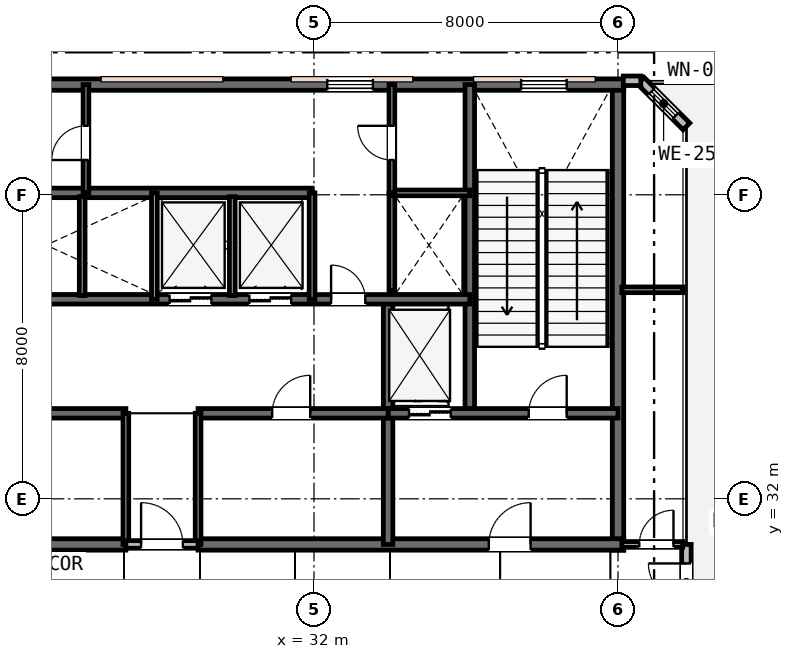
"""IFC4 building model, lengths in metres.
Left out: names, types, materials, properties, quantities, classifications, styles, units other than length and angle.
Written with IfcOpenShell. Run it as: python <this file> out.ifc"""

import sys

from ifc_helpers import new_model, si_unit, direction, frame, frame_2d, origin, place, context, subcontext, project, spatial, rectangle, extrude, element, fill, save


model = new_model("IFC4")
c1 = context("Model", 3, precision=1e-05, world=origin(), true_north=direction((0.0, 1.0)))
c2 = subcontext(c1, "Body", "Model", "MODEL_VIEW")
j1 = project(units=[si_unit("LENGTHUNIT", "METRE"), si_unit("PLANEANGLEUNIT", "RADIAN")], contexts=[c1])
p1 = place(None, origin())
s1 = spatial("IfcSite", under=j1, at=p1, CompositionType="ELEMENT")
p2 = place(p1, origin())
s2 = spatial("IfcBuilding", under=s1, at=p2, CompositionType="ELEMENT")
p3 = place(p2, frame((0.0, 0.0, 290.6)))
s3 = spatial("IfcBuildingStorey", under=s2, at=p3, CompositionType="ELEMENT", Elevation=290.6)
p4 = place(p3, frame((40.0, 30.65, 0.0), z_axis=(0.0, 0.0, 1.0), x_axis=(0.0, 1.0, 0.0)))
e1 = element("IfcWall", 1, at=p4, inside=s3, PredefinedType="SHEAR", context=c2, shape_type="SweptSolid", body=[
    extrude(rectangle(XDim=12.3, YDim=0.3, at=frame_2d((6.15, 0.0))), origin(), (0.0, 0.0, 1.0), 5.2),
])
p5 = place(p3, frame((15.85, 42.9, 0.0), z_axis=(0.0, 0.0, 1.0), x_axis=(1.0, 0.0, 0.0)))
e2 = element("IfcWall", 2, at=p5, inside=s3, PredefinedType="SHEAR", context=c2, shape_type="SweptSolid", body=[
    extrude(rectangle(XDim=24.3, YDim=0.3, at=frame_2d((12.15, 0.0))), origin(), (0.0, 0.0, 1.0), 5.2),
])
p6 = place(p5, frame((1.6, 0.0, 0.95)))
e3 = element("IfcOpeningElement", 3, at=p6, cuts=e2, PredefinedType="OPENING", context=c2, shape_type="SweptSolid", body=[
    extrude(rectangle(XDim=1.2, YDim=1.6, at=frame_2d((0.6, 0.8))), frame((0.0, 0.16, 0.0), z_axis=(0.0, -1.0, 0.0), x_axis=(1.0, 0.0, 0.0)), (0.0, 0.0, 1.0), 0.32),
])
p7 = place(p5, frame((16.5, 0.0, 0.95)))
e4 = element("IfcOpeningElement", 4, at=p7, cuts=e2, PredefinedType="OPENING", context=c2, shape_type="SweptSolid", body=[
    extrude(rectangle(XDim=1.2, YDim=1.6, at=frame_2d((0.6, 0.8))), frame((0.0, 0.16, 0.0), z_axis=(0.0, -1.0, 0.0), x_axis=(1.0, 0.0, 0.0)), (0.0, 0.0, 1.0), 0.32),
])
p8 = place(p5, frame((21.6, 0.0, 0.95)))
e5 = element("IfcOpeningElement", 5, at=p8, cuts=e2, PredefinedType="OPENING", context=c2, shape_type="SweptSolid", body=[
    extrude(rectangle(XDim=1.2, YDim=1.6, at=frame_2d((0.6, 0.8))), frame((0.0, 0.16, 0.0), z_axis=(0.0, -1.0, 0.0), x_axis=(1.0, 0.0, 0.0)), (0.0, 0.0, 1.0), 0.32),
])
p9 = place(p3, frame((15.85, 30.8, 0.0), z_axis=(0.0, 0.0, 1.0), x_axis=(1.0, 0.0, 0.0)))
e6 = element("IfcWall", 6, at=p9, inside=s3, PredefinedType="SHEAR", context=c2, shape_type="SweptSolid", body=[
    extrude(rectangle(XDim=11.2, YDim=0.3, at=frame_2d((5.6, 0.0))), origin(), (0.0, 0.0, 1.0), 5.2),
])
p10 = place(p9, frame((2.45, 0.0, 0.0)))
e7 = element("IfcOpeningElement", 7, at=p10, cuts=e6, PredefinedType="OPENING", context=c2, shape_type="SweptSolid", body=[
    extrude(rectangle(XDim=1.1, YDim=2.15, at=frame_2d((0.55, 1.075))), frame((0.0, 0.16, 0.0), z_axis=(0.0, -1.0, 0.0), x_axis=(1.0, 0.0, 0.0)), (0.0, 0.0, 1.0), 0.32),
])
p11 = place(p3, frame((28.95, 30.8, 0.0), z_axis=(0.0, 0.0, 1.0), x_axis=(1.0, 0.0, 0.0)))
e8 = element("IfcWall", 8, at=p11, inside=s3, PredefinedType="SHEAR", context=c2, shape_type="SweptSolid", body=[
    extrude(rectangle(XDim=11.2, YDim=0.3, at=frame_2d((5.6, 0.0))), origin(), (0.0, 0.0, 1.0), 5.2),
])
p12 = place(p11, frame((7.65, 0.0, 0.0)))
e9 = element("IfcOpeningElement", 9, at=p12, cuts=e8, PredefinedType="OPENING", context=c2, shape_type="SweptSolid", body=[
    extrude(rectangle(XDim=1.1, YDim=2.15, at=frame_2d((0.55, 1.075))), frame((0.0, 0.16, 0.0), z_axis=(0.0, -1.0, 0.0), x_axis=(1.0, 0.0, 0.0)), (0.0, 0.0, 1.0), 0.32),
])
p13 = place(p3, frame((36.1, 34.25, 0.0), z_axis=(0.0, 0.0, 1.0), x_axis=(0.0, 1.0, 0.0)))
e10 = element("IfcWall", 10, at=p13, inside=s3, PredefinedType="SHEAR", context=c2, shape_type="SweptSolid", body=[
    extrude(rectangle(XDim=8.65, YDim=0.25, at=frame_2d((4.325, 0.0))), origin(), (0.0, 0.0, 1.0), 5.2),
])
p14 = place(p3, frame((33.95, 30.8, 0.0), z_axis=(0.0, 0.0, 1.0), x_axis=(0.0, 1.0, 0.0)))
e11 = element("IfcWall", 11, at=p14, inside=s3, PredefinedType="SHEAR", context=c2, shape_type="SweptSolid", body=[
    extrude(rectangle(XDim=6.45, YDim=0.25, at=frame_2d((3.225, 0.0))), origin(), (0.0, 0.0, 1.0), 5.2),
])
p15 = place(p3, frame((33.95, 34.25, 0.0), z_axis=(0.0, 0.0, 1.0), x_axis=(1.0, 0.0, 0.0)))
e12 = element("IfcWall", 12, at=p15, inside=s3, PredefinedType="SHEAR", context=c2, shape_type="SweptSolid", body=[
    extrude(rectangle(XDim=6.05, YDim=0.25, at=frame_2d((3.025, 0.0))), origin(), (0.0, 0.0, 1.0), 5.2),
])
p16 = place(p15, frame((3.7, 0.0, 0.0)))
e13 = element("IfcOpeningElement", 13, at=p16, cuts=e12, PredefinedType="OPENING", context=c2, shape_type="SweptSolid", body=[
    extrude(rectangle(XDim=1.0, YDim=2.15, at=frame_2d((0.5, 1.075))), frame((0.0, 0.135, 0.0), z_axis=(0.0, -1.0, 0.0), x_axis=(1.0, 0.0, 0.0)), (0.0, 0.0, 1.0), 0.27),
])
p17 = place(p15, frame((0.55, 0.0, 0.0)))
e14 = element("IfcOpeningElement", 14, at=p17, cuts=e12, PredefinedType="OPENING", context=c2, shape_type="SweptSolid", body=[
    extrude(rectangle(XDim=1.1, YDim=2.15, at=frame_2d((0.55, 1.075))), frame((0.0, 0.135, 0.0), z_axis=(0.0, -1.0, 0.0), x_axis=(1.0, 0.0, 0.0)), (0.0, 0.0, 1.0), 0.27),
])
p18 = place(p3, frame((22.05, 34.25, 0.0), z_axis=(0.0, 0.0, 1.0), x_axis=(1.0, 0.0, 0.0)))
e15 = element("IfcWall", 15, at=p18, inside=s3, PredefinedType="SHEAR", context=c2, shape_type="SweptSolid", body=[
    extrude(rectangle(XDim=5.0, YDim=0.25, at=frame_2d((2.5, 0.0))), origin(), (0.0, 0.0, 1.0), 5.2),
])
p19 = place(p18, frame((1.95, 0.0, 0.0)))
e16 = element("IfcOpeningElement", 16, at=p19, cuts=e15, PredefinedType="OPENING", context=c2, shape_type="SweptSolid", body=[
    extrude(rectangle(XDim=1.0, YDim=2.15, at=frame_2d((0.5, 1.075))), frame((0.0, 0.135, 0.0), z_axis=(0.0, -1.0, 0.0), x_axis=(1.0, 0.0, 0.0)), (0.0, 0.0, 1.0), 0.27),
])
p20 = place(p3, frame((28.95, 34.25, 0.0), z_axis=(0.0, 0.0, 1.0), x_axis=(1.0, 0.0, 0.0)))
e17 = element("IfcWall", 17, at=p20, inside=s3, PredefinedType="SHEAR", context=c2, shape_type="SweptSolid", body=[
    extrude(rectangle(XDim=5.0, YDim=0.25, at=frame_2d((2.5, 0.0))), origin(), (0.0, 0.0, 1.0), 5.2),
])
p21 = place(p20, frame((1.95, 0.0, 0.0)))
e18 = element("IfcOpeningElement", 18, at=p21, cuts=e17, PredefinedType="OPENING", context=c2, shape_type="SweptSolid", body=[
    extrude(rectangle(XDim=1.0, YDim=2.15, at=frame_2d((0.5, 1.075))), frame((0.0, 0.135, 0.0), z_axis=(0.0, -1.0, 0.0), x_axis=(1.0, 0.0, 0.0)), (0.0, 0.0, 1.0), 0.27),
])
p22 = place(p3, frame((19.9, 37.25, 0.0), z_axis=(0.0, 0.0, 1.0), x_axis=(1.0, 0.0, 0.0)))
e19 = element("IfcWall", 19, at=p22, inside=s3, PredefinedType="SHEAR", context=c2, shape_type="SweptSolid", body=[
    extrude(rectangle(XDim=16.2, YDim=0.25, at=frame_2d((8.1, 0.0))), origin(), (0.0, 0.0, 1.0), 5.2),
])
p23 = place(p22, frame((12.55, 0.0, 0.0)))
e20 = element("IfcOpeningElement", 20, at=p23, cuts=e19, PredefinedType="OPENING", context=c2, shape_type="SweptSolid", body=[
    extrude(rectangle(XDim=0.9, YDim=2.15, at=frame_2d((0.45, 1.075))), frame((0.0, 0.135, 0.0), z_axis=(0.0, -1.0, 0.0), x_axis=(1.0, 0.0, 0.0)), (0.0, 0.0, 1.0), 0.27),
])
p24 = place(p22, frame((8.3, 0.0, 0.0)))
e21 = element("IfcOpeningElement", 21, at=p24, cuts=e19, PredefinedType="OPENING", context=c2, shape_type="SweptSolid", body=[
    extrude(rectangle(XDim=1.1, YDim=2.15, at=frame_2d((0.55, 1.075))), frame((0.0, 0.135, 0.0), z_axis=(0.0, -1.0, 0.0), x_axis=(1.0, 0.0, 0.0)), (0.0, 0.0, 1.0), 0.27),
])
p25 = place(p22, frame((10.4, 0.0, 0.0)))
e22 = element("IfcOpeningElement", 22, at=p25, cuts=e19, PredefinedType="OPENING", context=c2, shape_type="SweptSolid", body=[
    extrude(rectangle(XDim=1.1, YDim=2.15, at=frame_2d((0.55, 1.075))), frame((0.0, 0.135, 0.0), z_axis=(0.0, -1.0, 0.0), x_axis=(1.0, 0.0, 0.0)), (0.0, 0.0, 1.0), 0.27),
])
p26 = place(p3, frame((19.9, 40.05, 0.0), z_axis=(0.0, 0.0, 1.0), x_axis=(1.0, 0.0, 0.0)))
e23 = element("IfcWall", 23, at=p26, inside=s3, PredefinedType="SHEAR", context=c2, shape_type="SweptSolid", body=[
    extrude(rectangle(XDim=12.05, YDim=0.25, at=frame_2d((6.025, 0.0))), origin(), (0.0, 0.0, 1.0), 5.2),
])
p27 = place(p3, frame((41.8, 28.8, 0.0), z_axis=(0.0, 0.0, 1.0), x_axis=(0.0, 1.0, 0.0)))
e24 = element("IfcWall", 24, at=p27, inside=s3, PredefinedType="STANDARD", context=c2, shape_type="SweptSolid", body=[
    extrude(rectangle(XDim=2.0, YDim=0.25, at=frame_2d((1.0, 0.0))), origin(), (0.0, 0.0, 1.0), 4.87),
])
p28 = place(p27, frame((0.5, 0.0, 0.0)))
e25 = element("IfcOpeningElement", 25, at=p28, cuts=e24, PredefinedType="OPENING", context=c2, shape_type="SweptSolid", body=[
    extrude(rectangle(XDim=1.0, YDim=2.15, at=frame_2d((0.5, 1.075))), frame((0.0, 0.135, 0.0), z_axis=(0.0, -1.0, 0.0), x_axis=(1.0, 0.0, 0.0)), (0.0, 0.0, 1.0), 0.27),
])
p29 = place(p3, frame((41.8, 41.8, 0.0), z_axis=(0.0, 0.0, 1.0), x_axis=(-0.707106781187, 0.707106781187, 0.0)))
e26 = element("IfcWall", 26, at=p29, inside=s3, PredefinedType="STANDARD", context=c2, shape_type="SweptSolid", body=[
    extrude(rectangle(XDim=1.697, YDim=0.25, at=frame_2d((0.849, 0.0))), origin(), (0.0, 0.0, 1.0), 4.87),
])
p30 = place(p29, frame((0.399, 0.0, 0.9)))
e27 = element("IfcOpeningElement", 27, at=p30, cuts=e26, PredefinedType="OPENING", context=c2, shape_type="SweptSolid", body=[
    extrude(rectangle(XDim=0.9, YDim=1.55, at=frame_2d((0.45, 0.775))), frame((0.0, 0.135, 0.0), z_axis=(0.0, -1.0, 0.0), x_axis=(1.0, 0.0, 0.0)), (0.0, 0.0, 1.0), 0.27),
])
p31 = place(p3, frame((40.6, 43.0, 0.0), z_axis=(0.0, 0.0, 1.0), x_axis=(-1.0, 0.0, 0.0)))
e28 = element("IfcWall", 28, at=p31, inside=s3, PredefinedType="STANDARD", context=c2, shape_type="SweptSolid", body=[
    extrude(rectangle(XDim=0.46, YDim=0.25, at=frame_2d((0.23, 0.0))), origin(), (0.0, 0.0, 1.0), 4.87),
])
for number, where, z_axis, x_axis in (
    (29, (27.05, 30.8, 0.0), (0.0, 0.0, 1.0), (0.0, 1.0, 0.0)),
    (30, (28.95, 30.8, 0.0), (0.0, 0.0, 1.0), (0.0, 1.0, 0.0)),
):
    element("IfcWall", number, at=place(p3, frame(where, z_axis=z_axis, x_axis=x_axis)), inside=s3, PredefinedType="PLUMBINGWALL", context=c2, shape_type="SweptSolid", body=[
        extrude(rectangle(XDim=3.45, YDim=0.15, at=frame_2d((1.725, 0.0))), origin(), (0.0, 0.0, 1.0), 4.67),
    ])
p32 = place(p3, frame((27.05, 30.8, 0.0), z_axis=(0.0, 0.0, 1.0), x_axis=(1.0, 0.0, 0.0)))
e31 = element("IfcWall", 31, at=p32, inside=s3, PredefinedType="PARTITIONING", context=c2, shape_type="SweptSolid", body=[
    extrude(rectangle(XDim=1.9, YDim=0.2, at=frame_2d((0.95, 0.0))), origin(), (0.0, 0.0, 1.0), 4.67),
])
p33 = place(p32, frame((0.4, 0.0, 0.0)))
e32 = element("IfcOpeningElement", 32, at=p33, cuts=e31, PredefinedType="OPENING", context=c2, shape_type="SweptSolid", body=[
    extrude(rectangle(XDim=1.1, YDim=2.15, at=frame_2d((0.55, 1.075))), frame((0.0, 0.11, 0.0), z_axis=(0.0, -1.0, 0.0), x_axis=(1.0, 0.0, 0.0)), (0.0, 0.0, 1.0), 0.22),
])
p34 = place(p3, frame((27.8, 37.25, 0.0), z_axis=(0.0, 0.0, 1.0), x_axis=(0.0, 1.0, 0.0)))
e33 = element("IfcWall", 33, at=p34, inside=s3, PredefinedType="PLUMBINGWALL", context=c2, shape_type="SweptSolid", body=[
    extrude(rectangle(XDim=2.8, YDim=0.15, at=frame_2d((1.4, 0.0))), origin(), (0.0, 0.0, 1.0), 4.87),
])
p35 = place(p3, frame((25.9, 37.35, 0.0), z_axis=(0.0, 0.0, 1.0), x_axis=(0.0, 1.0, 0.0)))
e34 = element("IfcWall", 34, at=p35, inside=s3, PredefinedType="PLUMBINGWALL", context=c2, shape_type="SweptSolid", body=[
    extrude(rectangle(XDim=2.6, YDim=0.15, at=frame_2d((1.3, 0.0))), origin(), (0.0, 0.0, 1.0), 4.87),
])
p36 = place(p3, frame((31.95, 37.25, 0.0), z_axis=(0.0, 0.0, 1.0), x_axis=(0.0, 1.0, 0.0)))
e35 = element("IfcWall", 35, at=p36, inside=s3, PredefinedType="PLUMBINGWALL", context=c2, shape_type="SweptSolid", body=[
    extrude(rectangle(XDim=2.8, YDim=0.15, at=frame_2d((1.4, 0.0))), origin(), (0.0, 0.0, 1.0), 4.87),
])
p37 = place(p3, frame((29.85, 37.35, 0.0), z_axis=(0.0, 0.0, 1.0), x_axis=(0.0, 1.0, 0.0)))
e36 = element("IfcWall", 36, at=p37, inside=s3, PredefinedType="PLUMBINGWALL", context=c2, shape_type="SweptSolid", body=[
    extrude(rectangle(XDim=2.6, YDim=0.15, at=frame_2d((1.3, 0.0))), origin(), (0.0, 0.0, 1.0), 4.87),
])
p38 = place(p3, frame((34.05, 37.473, 0.0), z_axis=(0.0, 0.0, 1.0), x_axis=(0.0, 1.0, 0.0)))
e37 = element("IfcWall", 37, at=p38, inside=s3, PredefinedType="PLUMBINGWALL", context=c2, shape_type="SweptSolid", body=[
    extrude(rectangle(XDim=2.577, YDim=0.15, at=frame_2d((1.288, 0.0))), origin(), (0.0, 0.0, 1.0), 4.87),
])
p39 = place(p3, frame((34.05, 40.05, 0.0), z_axis=(0.0, 0.0, 1.0), x_axis=(1.0, 0.0, 0.0)))
e38 = element("IfcWall", 38, at=p39, inside=s3, PredefinedType="PARTITIONING", context=c2, shape_type="SweptSolid", body=[
    extrude(rectangle(XDim=2.05, YDim=0.15, at=frame_2d((1.025, 0.0))), origin(), (0.0, 0.0, 1.0), 4.87),
])
p40 = place(p3, frame((34.05, 40.05, 0.0), z_axis=(0.0, 0.0, 1.0), x_axis=(0.0, 1.0, 0.0)))
e39 = element("IfcWall", 39, at=p40, inside=s3, PredefinedType="PARTITIONING", context=c2, shape_type="SweptSolid", body=[
    extrude(rectangle(XDim=2.85, YDim=0.15, at=frame_2d((1.425, 0.0))), origin(), (0.0, 0.0, 1.0), 4.87),
])
p41 = place(p40, frame((0.865, 0.0, 0.0)))
e40 = element("IfcOpeningElement", 40, at=p41, cuts=e39, PredefinedType="OPENING", context=c2, shape_type="SweptSolid", body=[
    extrude(rectangle(XDim=0.9, YDim=2.15, at=frame_2d((0.45, 1.075))), frame((0.0, 0.085, 0.0), z_axis=(0.0, -1.0, 0.0), x_axis=(1.0, 0.0, 0.0)), (0.0, 0.0, 1.0), 0.17),
])
p42 = place(p3, frame((26.0, 40.05, 0.0), z_axis=(0.0, 0.0, 1.0), x_axis=(0.0, 1.0, 0.0)))
e41 = element("IfcWall", 41, at=p42, inside=s3, PredefinedType="PARTITIONING", context=c2, shape_type="SweptSolid", body=[
    extrude(rectangle(XDim=2.85, YDim=0.15, at=frame_2d((1.425, 0.0))), origin(), (0.0, 0.0, 1.0), 4.87),
])
p43 = place(p42, frame((0.865, 0.0, 0.0)))
e42 = element("IfcOpeningElement", 42, at=p43, cuts=e41, PredefinedType="OPENING", context=c2, shape_type="SweptSolid", body=[
    extrude(rectangle(XDim=0.9, YDim=2.15, at=frame_2d((0.45, 1.075))), frame((0.0, 0.085, 0.0), z_axis=(0.0, -1.0, 0.0), x_axis=(1.0, 0.0, 0.0)), (0.0, 0.0, 1.0), 0.17),
])
p44 = place(p3, frame((40.1, 30.8, 0.0), z_axis=(0.0, 0.0, 1.0), x_axis=(1.0, 0.0, 0.0)))
e43 = element("IfcWall", 43, at=p44, inside=s3, PredefinedType="PARTITIONING", context=c2, shape_type="SweptSolid", body=[
    extrude(rectangle(XDim=1.6, YDim=0.15, at=frame_2d((0.8, 0.0))), origin(), (0.0, 0.0, 1.0), 4.87),
])
p45 = place(p44, frame((0.46, 0.0, 0.0)))
e44 = element("IfcOpeningElement", 44, at=p45, cuts=e43, PredefinedType="OPENING", context=c2, shape_type="SweptSolid", body=[
    extrude(rectangle(XDim=0.9, YDim=2.15, at=frame_2d((0.45, 1.075))), frame((0.0, 0.085, 0.0), z_axis=(0.0, -1.0, 0.0), x_axis=(1.0, 0.0, 0.0)), (0.0, 0.0, 1.0), 0.17),
])
p46 = place(p3, frame((40.1, 37.5, 0.0), z_axis=(0.0, 0.0, 1.0), x_axis=(1.0, 0.0, 0.0)))
e45 = element("IfcWall", 45, at=p46, inside=s3, PredefinedType="PARTITIONING", context=c2, shape_type="SweptSolid", body=[
    extrude(rectangle(XDim=1.6, YDim=0.15, at=frame_2d((0.8, 0.0))), origin(), (0.0, 0.0, 1.0), 4.87),
])
p47 = place(p7, origin())
e46 = element("IfcWindow", 46, at=p47, inside=s3, PartitioningType="SINGLE_PANEL", PredefinedType="WINDOW", context=c2, shape_type="SweptSolid", body=[
    extrude(rectangle(XDim=1.2, YDim=1.6, at=frame_2d((0.6, 0.8))), frame((0.0, 0.03, 0.0), z_axis=(0.0, -1.0, 0.0), x_axis=(1.0, 0.0, 0.0)), (0.0, 0.0, 1.0), 0.06),
])
fill(e4, e46)
p48 = place(p8, origin())
e47 = element("IfcWindow", 47, at=p48, inside=s3, PartitioningType="SINGLE_PANEL", PredefinedType="WINDOW", context=c2, shape_type="SweptSolid", body=[
    extrude(rectangle(XDim=1.2, YDim=1.6, at=frame_2d((0.6, 0.8))), frame((0.0, 0.03, 0.0), z_axis=(0.0, -1.0, 0.0), x_axis=(1.0, 0.0, 0.0)), (0.0, 0.0, 1.0), 0.06),
])
fill(e5, e47)
p49 = place(p28, origin())
e48 = element("IfcDoor", 48, at=p49, inside=s3, OperationType="SINGLE_SWING_RIGHT", PredefinedType="DOOR", context=c2, shape_type="SweptSolid", body=[
    extrude(rectangle(XDim=1.0, YDim=2.15, at=frame_2d((0.5, 1.075))), frame((0.0, 0.025, 0.0), z_axis=(0.0, -1.0, 0.0), x_axis=(1.0, 0.0, 0.0)), (0.0, 0.0, 1.0), 0.05),
])
fill(e25, e48)
p50 = place(p30, origin())
e49 = element("IfcWindow", 49, at=p50, inside=s3, PartitioningType="SINGLE_PANEL", PredefinedType="WINDOW", context=c2, shape_type="SweptSolid", body=[
    extrude(rectangle(XDim=0.9, YDim=1.55, at=frame_2d((0.45, 0.775))), frame((0.0, 0.03, 0.0), z_axis=(0.0, -1.0, 0.0), x_axis=(1.0, 0.0, 0.0)), (0.0, 0.0, 1.0), 0.06),
])
fill(e27, e49)
p51 = place(p33, origin())
e50 = element("IfcDoor", 50, at=p51, inside=s3, OperationType="SINGLE_SWING_LEFT", PredefinedType="DOOR", context=c2, shape_type="SweptSolid", body=[
    extrude(rectangle(XDim=1.1, YDim=2.15, at=frame_2d((0.55, 1.075))), frame((0.0, 0.025, 0.0), z_axis=(0.0, -1.0, 0.0), x_axis=(1.0, 0.0, 0.0)), (0.0, 0.0, 1.0), 0.05),
])
fill(e32, e50)
p52 = place(p16, origin())
e51 = element("IfcDoor", 51, at=p52, inside=s3, OperationType="SINGLE_SWING_RIGHT", PredefinedType="DOOR", context=c2, shape_type="SweptSolid", body=[
    extrude(rectangle(XDim=1.0, YDim=2.15, at=frame_2d((0.5, 1.075))), frame((0.0, 0.025, 0.0), z_axis=(0.0, -1.0, 0.0), x_axis=(1.0, 0.0, 0.0)), (0.0, 0.0, 1.0), 0.05),
])
fill(e13, e51)
p53 = place(p12, origin())
e52 = element("IfcDoor", 52, at=p53, inside=s3, OperationType="SINGLE_SWING_RIGHT", PredefinedType="DOOR", context=c2, shape_type="SweptSolid", body=[
    extrude(rectangle(XDim=1.1, YDim=2.15, at=frame_2d((0.55, 1.075))), frame((0.0, 0.025, 0.0), z_axis=(0.0, -1.0, 0.0), x_axis=(1.0, 0.0, 0.0)), (0.0, 0.0, 1.0), 0.05),
])
fill(e9, e52)
p54 = place(p21, origin())
e53 = element("IfcDoor", 53, at=p54, inside=s3, OperationType="SINGLE_SWING_RIGHT", PredefinedType="DOOR", context=c2, shape_type="SweptSolid", body=[
    extrude(rectangle(XDim=1.0, YDim=2.15, at=frame_2d((0.5, 1.075))), frame((0.0, 0.025, 0.0), z_axis=(0.0, -1.0, 0.0), x_axis=(1.0, 0.0, 0.0)), (0.0, 0.0, 1.0), 0.05),
])
fill(e18, e53)
p55 = place(p23, origin())
e54 = element("IfcDoor", 54, at=p55, inside=s3, OperationType="SINGLE_SWING_LEFT", PredefinedType="DOOR", context=c2, shape_type="SweptSolid", body=[
    extrude(rectangle(XDim=0.9, YDim=2.15, at=frame_2d((0.45, 1.075))), frame((0.0, 0.025, 0.0), z_axis=(0.0, -1.0, 0.0), x_axis=(1.0, 0.0, 0.0)), (0.0, 0.0, 1.0), 0.05),
])
fill(e20, e54)
p56 = place(p41, origin())
e55 = element("IfcDoor", 55, at=p56, inside=s3, OperationType="SINGLE_SWING_RIGHT", PredefinedType="DOOR", context=c2, shape_type="SweptSolid", body=[
    extrude(rectangle(XDim=0.9, YDim=2.15, at=frame_2d((0.45, 1.075))), frame((0.0, 0.025, 0.0), z_axis=(0.0, -1.0, 0.0), x_axis=(1.0, 0.0, 0.0)), (0.0, 0.0, 1.0), 0.05),
])
fill(e40, e55)
p57 = place(p43, origin())
e56 = element("IfcDoor", 56, at=p57, inside=s3, OperationType="SINGLE_SWING_LEFT", PredefinedType="DOOR", context=c2, shape_type="SweptSolid", body=[
    extrude(rectangle(XDim=0.9, YDim=2.15, at=frame_2d((0.45, 1.075))), frame((0.0, 0.025, 0.0), z_axis=(0.0, -1.0, 0.0), x_axis=(1.0, 0.0, 0.0)), (0.0, 0.0, 1.0), 0.05),
])
fill(e42, e56)
p58 = place(p45, origin())
e57 = element("IfcDoor", 57, at=p58, inside=s3, OperationType="SINGLE_SWING_RIGHT", PredefinedType="DOOR", context=c2, shape_type="SweptSolid", body=[
    extrude(rectangle(XDim=0.9, YDim=2.15, at=frame_2d((0.45, 1.075))), frame((0.0, 0.025, 0.0), z_axis=(0.0, -1.0, 0.0), x_axis=(1.0, 0.0, 0.0)), (0.0, 0.0, 1.0), 0.05),
])
fill(e44, e57)
p59 = place(p17, origin())
e58 = element("IfcDoor", 58, at=p59, inside=s3, OperationType="DOUBLE_DOOR_SLIDING", PredefinedType="DOOR", context=c2, shape_type="SweptSolid", body=[
    extrude(rectangle(XDim=1.1, YDim=2.15, at=frame_2d((0.55, 1.075))), frame((0.0, 0.025, 0.0), z_axis=(0.0, -1.0, 0.0), x_axis=(1.0, 0.0, 0.0)), (0.0, 0.0, 1.0), 0.05),
])
fill(e14, e58)
p60 = place(p24, origin())
e59 = element("IfcDoor", 59, at=p60, inside=s3, OperationType="DOUBLE_DOOR_SLIDING", PredefinedType="DOOR", context=c2, shape_type="SweptSolid", body=[
    extrude(rectangle(XDim=1.1, YDim=2.15, at=frame_2d((0.55, 1.075))), frame((0.0, 0.025, 0.0), z_axis=(0.0, -1.0, 0.0), x_axis=(1.0, 0.0, 0.0)), (0.0, 0.0, 1.0), 0.05),
])
fill(e21, e59)
p61 = place(p25, origin())
e60 = element("IfcDoor", 60, at=p61, inside=s3, OperationType="DOUBLE_DOOR_SLIDING", PredefinedType="DOOR", context=c2, shape_type="SweptSolid", body=[
    extrude(rectangle(XDim=1.1, YDim=2.15, at=frame_2d((0.55, 1.075))), frame((0.0, 0.025, 0.0), z_axis=(0.0, -1.0, 0.0), x_axis=(1.0, 0.0, 0.0)), (0.0, 0.0, 1.0), 0.05),
])
fill(e22, e60)
save(model, sys.argv[1])
